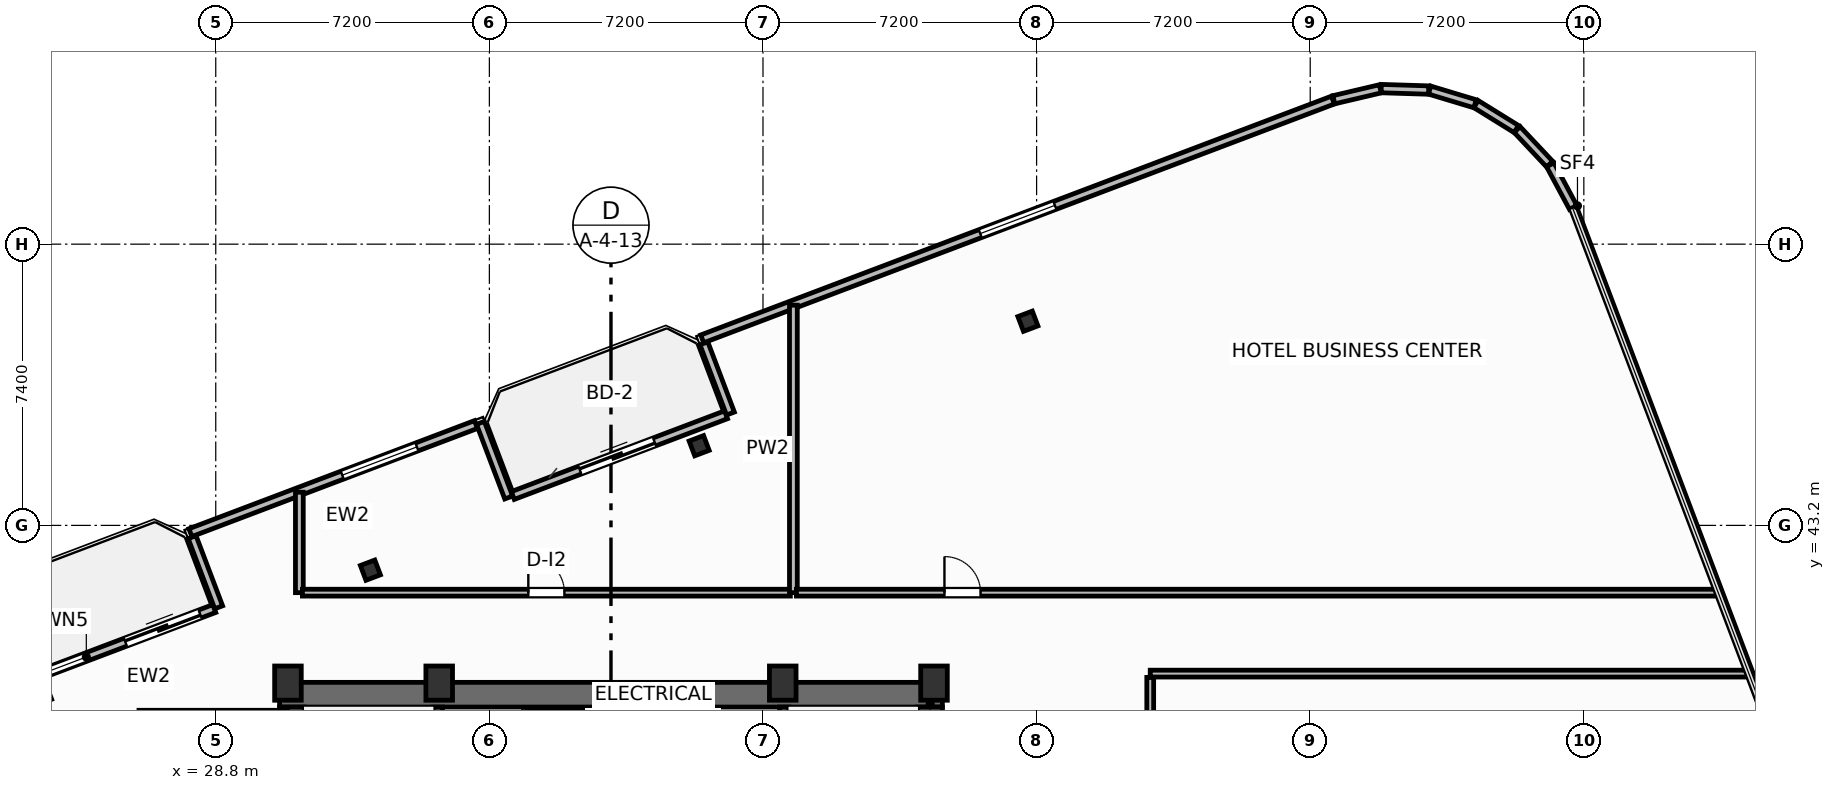
"""IFC4 building model, lengths in metres.
Left out: names, types, materials, properties, quantities, classifications, styles, units other than length and angle.
Written with IfcOpenShell. Run it as: python <this file> out.ifc"""

import sys

from ifc_helpers import new_model, si_unit, direction, frame, frame_2d, origin, origin_2d, place, context, subcontext, project, spatial, rectangle, i_section, extrude, element, fill, save


model = new_model("IFC4")
c1 = context("Model", 3, precision=1e-05, world=origin(), true_north=direction((0.0, 1.0)))
c2 = subcontext(c1, "Body", "Model", "MODEL_VIEW")
j1 = project(units=[si_unit("LENGTHUNIT", "METRE"), si_unit("PLANEANGLEUNIT", "RADIAN")], contexts=[c1])
p1 = place(None, origin())
s1 = spatial("IfcSite", under=j1, at=p1, CompositionType="ELEMENT")
p2 = place(p1, origin())
s2 = spatial("IfcBuilding", under=s1, at=p2, CompositionType="ELEMENT")
p3 = place(p2, frame((0.0, 0.0, 231.2)))
s3 = spatial("IfcBuildingStorey", under=s2, at=p3, CompositionType="ELEMENT", Elevation=231.2)
for number, where, z_axis, x_axis in (
    (1, (30.7, 39.05, 0.0), (0.0, 0.0, 1.0), (1.0, 0.0, 0.0)),
    (2, (34.68, 39.05, 0.0), (0.0, 0.0, 1.0), (1.0, 0.0, 0.0)),
    (3, (43.72, 39.05, 0.0), (0.0, 0.0, 1.0), (1.0, 0.0, 0.0)),
    (4, (47.7, 39.05, 0.0), (0.0, 0.0, 1.0), (1.0, 0.0, 0.0)),
):
    element("IfcColumn", number, at=place(p3, frame(where, z_axis=z_axis, x_axis=x_axis)), inside=s3, PredefinedType="COLUMN", context=c2, shape_type="SweptSolid", body=[
        extrude(rectangle(XDim=0.7, YDim=0.9, at=origin_2d()), origin(), (0.0, 0.0, 1.0), 3.7),
    ])
p4 = place(p3, frame((30.48, 38.745, 0.0), z_axis=(0.0, 0.0, 1.0), x_axis=(1.0, 0.0, 0.0)))
e5 = element("IfcWall", 5, at=p4, inside=s3, PredefinedType="SHEAR", context=c2, shape_type="SweptSolid", body=[
    extrude(rectangle(XDim=17.44, YDim=0.65, at=frame_2d((8.72, 0.0))), origin(), (0.0, 0.0, 1.0), 3.45),
])
for number, where, z_axis, x_axis in (
    (6, (30.805, 29.2, 0.0), (0.0, 0.0, 1.0), (0.0, 1.0, 0.0)),
    (7, (47.595, 29.2, 0.0), (0.0, 0.0, 1.0), (0.0, 1.0, 0.0)),
):
    element("IfcWall", number, at=place(p3, frame(where, z_axis=z_axis, x_axis=x_axis)), inside=s3, PredefinedType="SHEAR", context=c2, shape_type="SweptSolid", body=[
        extrude(rectangle(XDim=9.22, YDim=0.65, at=frame_2d((4.61, 0.0))), origin(), (0.0, 0.0, 1.0), 3.45),
    ])
p5 = place(p3, frame((34.64, 29.2, 0.0), z_axis=(0.0, 0.0, 1.0), x_axis=(0.0, 1.0, 0.0)))
e8 = element("IfcWall", 8, at=p5, inside=s3, PredefinedType="SHEAR", context=c2, shape_type="SweptSolid", body=[
    extrude(rectangle(XDim=9.22, YDim=0.25, at=frame_2d((4.61, 0.0))), origin(), (0.0, 0.0, 1.0), 3.45),
])
p6 = place(p5, frame((0.65, 0.0, 0.0)))
e9 = element("IfcOpeningElement", 9, at=p6, cuts=e8, PredefinedType="OPENING", context=c2, shape_type="SweptSolid", body=[
    extrude(rectangle(XDim=1.05, YDim=2.15, at=frame_2d((0.525, 1.075))), frame((0.0, 0.135, 0.0), z_axis=(0.0, -1.0, 0.0), x_axis=(1.0, 0.0, 0.0)), (0.0, 0.0, 1.0), 0.27),
])
p7 = place(p3, frame((43.76, 29.2, 0.0), z_axis=(0.0, 0.0, 1.0), x_axis=(0.0, 1.0, 0.0)))
e10 = element("IfcWall", 10, at=p7, inside=s3, PredefinedType="SHEAR", context=c2, shape_type="SweptSolid", body=[
    extrude(rectangle(XDim=9.22, YDim=0.25, at=frame_2d((4.61, 0.0))), origin(), (0.0, 0.0, 1.0), 3.45),
])
p8 = place(p7, frame((0.65, 0.0, 0.0)))
e11 = element("IfcOpeningElement", 11, at=p8, cuts=e10, PredefinedType="OPENING", context=c2, shape_type="SweptSolid", body=[
    extrude(rectangle(XDim=1.05, YDim=2.15, at=frame_2d((0.525, 1.075))), frame((0.0, 0.135, 0.0), z_axis=(0.0, -1.0, 0.0), x_axis=(1.0, 0.0, 0.0)), (0.0, 0.0, 1.0), 0.27),
])
for number, where, z_axis, x_axis in (
    (12, (50.171, 48.572, 0.0), (0.0, 0.0, 1.0), (0.935, 0.354, 0.0)),
    (13, (41.52, 45.297, 0.0), (0.0, 0.0, 1.0), (0.935, 0.354, 0.0)),
    (14, (32.869, 42.022, 0.0), (0.0, 0.0, 1.0), (0.935, 0.354, 0.0)),
):
    element("IfcColumn", number, at=place(p3, frame(where, z_axis=z_axis, x_axis=x_axis)), inside=s3, PredefinedType="COLUMN", context=c2, shape_type="SweptSolid", body=[
        extrude(i_section(OverallWidth=0.406, OverallDepth=0.416, WebThickness=0.03, FlangeThickness=0.048, FilletRadius=0.025, at=origin_2d()), origin(), (0.0, 0.0, 1.0), 3.7),
    ])
p9 = place(p3, frame((23.149, 38.887, 0.0), z_axis=(0.0, 0.0, 1.0), x_axis=(0.9352192676, 0.354069091436, 0.0)))
e15 = element("IfcWall", 15, at=p9, inside=s3, PredefinedType="SOLIDWALL", context=c2, shape_type="SweptSolid", body=[
    extrude(rectangle(XDim=6.0, YDim=0.22, at=frame_2d((3.0, 0.0))), origin(), (0.0, 0.0, 1.0), 2.73),
])
p10 = place(p9, frame((3.5, 0.0, 0.0)))
e16 = element("IfcOpeningElement", 16, at=p10, cuts=e15, PredefinedType="OPENING", context=c2, shape_type="SweptSolid", body=[
    extrude(rectangle(XDim=2.1, YDim=2.3, at=frame_2d((1.05, 1.15))), frame((0.0, 0.12, 0.0), z_axis=(0.0, -1.0, 0.0), x_axis=(1.0, 0.0, 0.0)), (0.0, 0.0, 1.0), 0.24),
])
p11 = place(p9, frame((0.55, 0.0, 0.75)))
e17 = element("IfcOpeningElement", 17, at=p11, cuts=e15, PredefinedType="OPENING", context=c2, shape_type="SweptSolid", body=[
    extrude(rectangle(XDim=1.85, YDim=1.75, at=frame_2d((0.925, 0.875))), frame((0.0, 0.12, 0.0), z_axis=(0.0, -1.0, 0.0), x_axis=(1.0, 0.0, 0.0)), (0.0, 0.0, 1.0), 0.24),
])
p12 = place(p3, frame((36.617, 43.986, 0.0), z_axis=(0.0, 0.0, 1.0), x_axis=(0.935227640088, 0.354046976001, 0.0)))
e18 = element("IfcWall", 18, at=p12, inside=s3, PredefinedType="SOLIDWALL", context=c2, shape_type="SweptSolid", body=[
    extrude(rectangle(XDim=6.0, YDim=0.22, at=frame_2d((3.0, 0.0))), origin(), (0.0, 0.0, 1.0), 2.73),
])
p13 = place(p12, frame((1.888, 0.0, 0.0)))
e19 = element("IfcOpeningElement", 19, at=p13, cuts=e18, PredefinedType="OPENING", context=c2, shape_type="SweptSolid", body=[
    extrude(rectangle(XDim=2.1, YDim=2.3, at=frame_2d((1.05, 1.15))), frame((0.0, 0.12, 0.0), z_axis=(0.0, -1.0, 0.0), x_axis=(1.0, 0.0, 0.0)), (0.0, 0.0, 1.0), 0.24),
])
p14 = place(p3, frame((64.519, 51.566, 0.0), z_axis=(0.0, 0.0, 1.0), x_axis=(-0.473093575122, 0.881012184466, 0.0)))
e20 = element("IfcWall", 20, at=p14, inside=s3, PredefinedType="SOLIDWALL", context=c2, shape_type="SweptSolid", body=[
    extrude(rectangle(XDim=1.274, YDim=0.22, at=frame_2d((0.637, 0.0))), origin(), (0.0, 0.0, 1.0), 2.73),
])
for number, where, z_axis, x_axis in (
    (21, (63.899, 52.706, 0.0), (0.0, 0.0, 1.0), (-0.685, 0.729, 0.0)),
    (22, (63.023, 53.629, 0.0), (0.0, 0.0, 1.0), (-0.85, 0.526, 0.0)),
):
    element("IfcWall", number, at=place(p3, frame(where, z_axis=z_axis, x_axis=x_axis)), inside=s3, PredefinedType="SOLIDWALL", context=c2, shape_type="SweptSolid", body=[
        extrude(rectangle(XDim=1.249, YDim=0.22, at=frame_2d((0.625, 0.0))), origin(), (0.0, 0.0, 1.0), 2.73),
    ])
for number, where, z_axis, x_axis in (
    (23, (61.937, 54.294, 0.0), (0.0, 0.0, 1.0), (-0.958, 0.288, 0.0)),
    (24, (60.717, 54.655, 0.0), (0.0, 0.0, 1.0), (-1.0, 0.031, 0.0)),
):
    element("IfcWall", number, at=place(p3, frame(where, z_axis=z_axis, x_axis=x_axis)), inside=s3, PredefinedType="SOLIDWALL", context=c2, shape_type="SweptSolid", body=[
        extrude(rectangle(XDim=1.249, YDim=0.22, at=frame_2d((0.624, 0.0))), origin(), (0.0, 0.0, 1.0), 2.73),
    ])
p15 = place(p3, frame((59.444, 54.688, 0.0), z_axis=(0.0, 0.0, 1.0), x_axis=(-0.973409523464, -0.229071821989, 0.0)))
e25 = element("IfcWall", 25, at=p15, inside=s3, PredefinedType="SOLIDWALL", context=c2, shape_type="SweptSolid", body=[
    extrude(rectangle(XDim=1.257, YDim=0.22, at=frame_2d((0.628, 0.0))), origin(), (0.0, 0.0, 1.0), 2.73),
])
p16 = place(p3, frame((58.198, 54.391, 0.0), z_axis=(0.0, 0.0, 1.0), x_axis=(-0.935223849772, -0.354056988094, 0.0)))
e26 = element("IfcWall", 26, at=p16, inside=s3, PredefinedType="SOLIDWALL", context=c2, shape_type="SweptSolid", body=[
    extrude(rectangle(XDim=17.747, YDim=0.22, at=frame_2d((8.874, 0.0))), origin(), (0.0, 0.0, 1.0), 2.73),
])
p17 = place(p16, frame((7.823, 0.0, 0.8)))
e27 = element("IfcOpeningElement", 27, at=p17, cuts=e26, PredefinedType="OPENING", context=c2, shape_type="SweptSolid", body=[
    extrude(rectangle(XDim=2.1, YDim=1.75, at=frame_2d((1.05, 0.875))), frame((0.0, 0.12, 0.0), z_axis=(0.0, -1.0, 0.0), x_axis=(1.0, 0.0, 0.0)), (0.0, 0.0, 1.0), 0.24),
])
p18 = place(p3, frame((41.645, 47.99, 0.0), z_axis=(0.0, 0.0, 1.0), x_axis=(0.354020680661, -0.935237594232, 0.0)))
e28 = element("IfcWall", 28, at=p18, inside=s3, PredefinedType="SOLIDWALL", context=c2, shape_type="SweptSolid", body=[
    extrude(rectangle(XDim=1.975, YDim=0.22, at=frame_2d((0.988, 0.0))), origin(), (0.0, 0.0, 1.0), 2.73),
])
p19 = place(p3, frame((36.508, 43.934, 0.0), z_axis=(0.0, 0.0, 1.0), x_axis=(-0.354128469405, 0.935196785258, 0.0)))
e29 = element("IfcWall", 29, at=p19, inside=s3, PredefinedType="SOLIDWALL", context=c2, shape_type="SweptSolid", body=[
    extrude(rectangle(XDim=2.1, YDim=0.22, at=frame_2d((1.05, 0.0))), origin(), (0.0, 0.0, 1.0), 2.73),
])
p20 = place(p3, frame((35.648, 45.854, 0.0), z_axis=(0.0, 0.0, 1.0), x_axis=(-0.935230796934, -0.354038636968, 0.0)))
e30 = element("IfcWall", 30, at=p20, inside=s3, PredefinedType="SOLIDWALL", context=c2, shape_type="SweptSolid", body=[
    extrude(rectangle(XDim=8.035, YDim=0.22, at=frame_2d((4.018, 0.0))), origin(), (0.0, 0.0, 1.0), 2.73),
])
p21 = place(p20, frame((1.662, 0.0, 0.8)))
e31 = element("IfcOpeningElement", 31, at=p21, cuts=e30, PredefinedType="OPENING", context=c2, shape_type="SweptSolid", body=[
    extrude(rectangle(XDim=2.1, YDim=1.75, at=frame_2d((1.05, 0.875))), frame((0.0, 0.12, 0.0), z_axis=(0.0, -1.0, 0.0), x_axis=(1.0, 0.0, 0.0)), (0.0, 0.0, 1.0), 0.24),
])
p22 = place(p3, frame((28.177, 42.892, 0.0), z_axis=(0.0, 0.0, 1.0), x_axis=(0.354061611705, -0.935222099352, 0.0)))
e32 = element("IfcWall", 32, at=p22, inside=s3, PredefinedType="SOLIDWALL", context=c2, shape_type="SweptSolid", body=[
    extrude(rectangle(XDim=1.975, YDim=0.22, at=frame_2d((0.987, 0.0))), origin(), (0.0, 0.0, 1.0), 2.73),
])
p23 = place(p3, frame((31.0, 41.43, 0.0), z_axis=(0.0, 0.0, 1.0), x_axis=(0.0, 1.0, 0.0)))
e33 = element("IfcWall", 33, at=p23, inside=s3, PredefinedType="PARTITIONING", context=c2, shape_type="SweptSolid", body=[
    extrude(rectangle(XDim=2.643, YDim=0.205, at=frame_2d((1.321, 0.0))), origin(), (0.0, 0.0, 1.0), 3.45),
])
p24 = place(p3, frame((31.08, 41.43, 0.0), z_axis=(0.0, 0.0, 1.0), x_axis=(1.0, 0.0, 0.0)))
e34 = element("IfcWall", 34, at=p24, inside=s3, PredefinedType="PARTITIONING", context=c2, shape_type="SweptSolid", body=[
    extrude(rectangle(XDim=12.84, YDim=0.18, at=frame_2d((6.42, 0.0))), origin(), (0.0, 0.0, 1.0), 3.018),
])
p25 = place(p24, frame((5.945, 0.0, 0.0)))
e35 = element("IfcOpeningElement", 35, at=p25, cuts=e34, PredefinedType="OPENING", context=c2, shape_type="SweptSolid", body=[
    extrude(rectangle(XDim=0.95, YDim=2.05, at=frame_2d((0.475, 1.025))), frame((0.0, 0.1, 0.0), z_axis=(0.0, -1.0, 0.0), x_axis=(1.0, 0.0, 0.0)), (0.0, 0.0, 1.0), 0.2),
])
p26 = place(p3, frame((44.0, 41.43, 0.0), z_axis=(0.0, 0.0, 1.0), x_axis=(0.0, 1.0, 0.0)))
e36 = element("IfcWall", 36, at=p26, inside=s3, PredefinedType="PARTITIONING", context=c2, shape_type="SweptSolid", body=[
    extrude(rectangle(XDim=7.564, YDim=0.205, at=frame_2d((3.782, 0.0))), origin(), (0.0, 0.0, 1.0), 3.45),
])
p27 = place(p3, frame((44.08, 41.43, 0.0), z_axis=(0.0, 0.0, 1.0), x_axis=(1.0, 0.0, 0.0)))
e37 = element("IfcWall", 37, at=p27, inside=s3, PredefinedType="PARTITIONING", context=c2, shape_type="SweptSolid", body=[
    extrude(rectangle(XDim=24.216, YDim=0.18, at=frame_2d((12.108, 0.0))), origin(), (0.0, 0.0, 1.0), 3.45),
])
p28 = place(p27, frame((3.895, 0.0, 0.0)))
e38 = element("IfcOpeningElement", 38, at=p28, cuts=e37, PredefinedType="OPENING", context=c2, shape_type="SweptSolid", body=[
    extrude(rectangle(XDim=0.95, YDim=2.05, at=frame_2d((0.475, 1.025))), frame((0.0, 0.1, 0.0), z_axis=(0.0, -1.0, 0.0), x_axis=(1.0, 0.0, 0.0)), (0.0, 0.0, 1.0), 0.2),
])
p29 = place(p3, frame((53.39, 27.53, 0.0), z_axis=(0.0, 0.0, 1.0), x_axis=(0.0, 1.0, 0.0)))
e39 = element("IfcWall", 39, at=p29, inside=s3, PredefinedType="PARTITIONING", context=c2, shape_type="SweptSolid", body=[
    extrude(rectangle(XDim=11.67, YDim=0.18, at=frame_2d((5.835, 0.0))), origin(), (0.0, 0.0, 1.0), 3.45),
])
p30 = place(p29, frame((5.8, 0.0, 0.0)))
e40 = element("IfcOpeningElement", 40, at=p30, cuts=e39, PredefinedType="OPENING", context=c2, shape_type="SweptSolid", body=[
    extrude(rectangle(XDim=0.92, YDim=2.05, at=frame_2d((0.46, 1.025))), frame((0.0, 0.1, 0.0), z_axis=(0.0, -1.0, 0.0), x_axis=(1.0, 0.0, 0.0)), (0.0, 0.0, 1.0), 0.2),
])
p31 = place(p3, frame((53.39, 39.3, 0.0), z_axis=(0.0, 0.0, 1.0), x_axis=(1.0, 0.0, 0.0)))
e41 = element("IfcWall", 41, at=p31, inside=s3, PredefinedType="PARTITIONING", context=c2, shape_type="SweptSolid", body=[
    extrude(rectangle(XDim=15.713, YDim=0.18, at=frame_2d((7.856, 0.0))), origin(), (0.0, 0.0, 1.0), 3.45),
])
p32 = place(p10, origin())
e42 = element("IfcDoor", 42, at=p32, inside=s3, OperationType="SLIDING_TO_LEFT", PredefinedType="DOOR", context=c2, shape_type="SweptSolid", body=[
    extrude(rectangle(XDim=2.1, YDim=2.3, at=frame_2d((1.05, 1.15))), frame((0.0, 0.025, 0.0), z_axis=(0.0, -1.0, 0.0), x_axis=(1.0, 0.0, 0.0)), (0.0, 0.0, 1.0), 0.05),
])
fill(e16, e42)
p33 = place(p11, origin())
e43 = element("IfcWindow", 43, at=p33, inside=s3, PartitioningType="SINGLE_PANEL", PredefinedType="WINDOW", context=c2, shape_type="SweptSolid", body=[
    extrude(rectangle(XDim=1.85, YDim=1.75, at=frame_2d((0.925, 0.875))), frame((0.0, 0.03, 0.0), z_axis=(0.0, -1.0, 0.0), x_axis=(1.0, 0.0, 0.0)), (0.0, 0.0, 1.0), 0.06),
])
fill(e17, e43)
p34 = place(p13, origin())
e44 = element("IfcDoor", 44, at=p34, inside=s3, OperationType="SLIDING_TO_LEFT", PredefinedType="DOOR", context=c2, shape_type="SweptSolid", body=[
    extrude(rectangle(XDim=2.1, YDim=2.3, at=frame_2d((1.05, 1.15))), frame((0.0, 0.025, 0.0), z_axis=(0.0, -1.0, 0.0), x_axis=(1.0, 0.0, 0.0)), (0.0, 0.0, 1.0), 0.05),
])
fill(e19, e44)
p35 = place(p17, origin())
e45 = element("IfcWindow", 45, at=p35, inside=s3, PartitioningType="SINGLE_PANEL", PredefinedType="WINDOW", context=c2, shape_type="SweptSolid", body=[
    extrude(rectangle(XDim=2.1, YDim=1.75, at=frame_2d((1.05, 0.875))), frame((0.0, 0.03, 0.0), z_axis=(0.0, -1.0, 0.0), x_axis=(1.0, 0.0, 0.0)), (0.0, 0.0, 1.0), 0.06),
])
fill(e27, e45)
p36 = place(p21, origin())
e46 = element("IfcWindow", 46, at=p36, inside=s3, PartitioningType="SINGLE_PANEL", PredefinedType="WINDOW", context=c2, shape_type="SweptSolid", body=[
    extrude(rectangle(XDim=2.1, YDim=1.75, at=frame_2d((1.05, 0.875))), frame((0.0, 0.03, 0.0), z_axis=(0.0, -1.0, 0.0), x_axis=(1.0, 0.0, 0.0)), (0.0, 0.0, 1.0), 0.06),
])
fill(e31, e46)
p37 = place(p25, origin())
e47 = element("IfcDoor", 47, at=p37, inside=s3, OperationType="SINGLE_SWING_LEFT", PredefinedType="DOOR", context=c2, shape_type="SweptSolid", body=[
    extrude(rectangle(XDim=0.95, YDim=2.05, at=frame_2d((0.475, 1.025))), frame((0.0, 0.025, 0.0), z_axis=(0.0, -1.0, 0.0), x_axis=(1.0, 0.0, 0.0)), (0.0, 0.0, 1.0), 0.05),
])
fill(e35, e47)
p38 = place(p28, origin())
e48 = element("IfcDoor", 48, at=p38, inside=s3, OperationType="SINGLE_SWING_LEFT", PredefinedType="DOOR", context=c2, shape_type="SweptSolid", body=[
    extrude(rectangle(XDim=0.95, YDim=2.05, at=frame_2d((0.475, 1.025))), frame((0.0, 0.025, 0.0), z_axis=(0.0, -1.0, 0.0), x_axis=(1.0, 0.0, 0.0)), (0.0, 0.0, 1.0), 0.05),
])
fill(e38, e48)
save(model, sys.argv[1])
